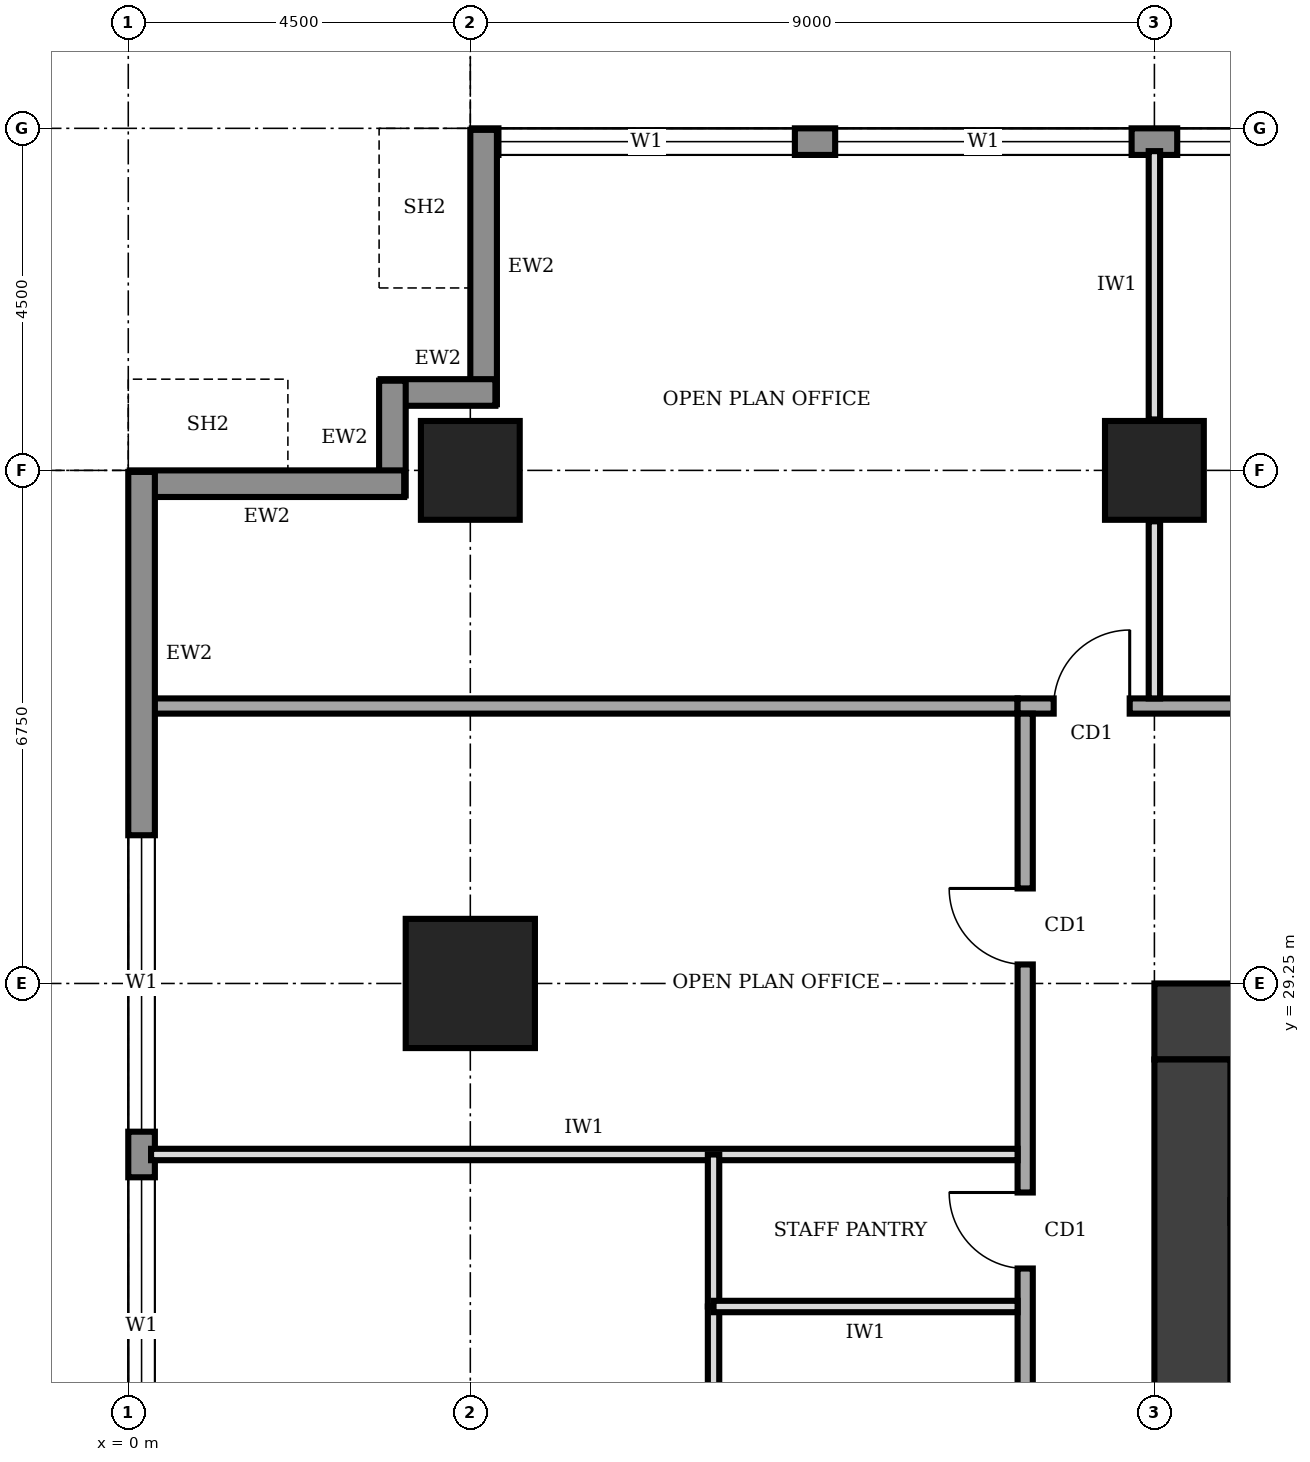
"""IFC4 building model, lengths in metres.
Left out: names, types, materials, properties, quantities, classifications, styles, units other than length and angle.
Written with IfcOpenShell. Run it as: python <this file> out.ifc"""

import sys

from ifc_helpers import new_model, si_unit, direction, frame, frame_2d, origin, origin_2d, place, context, subcontext, project, spatial, rectangle, extrude, element, fill, save


model = new_model("IFC4")
c1 = context("Model", 3, precision=1e-05, world=origin(), true_north=direction((0.0, 1.0)))
c2 = subcontext(c1, "Body", "Model", "MODEL_VIEW")
j1 = project(units=[si_unit("LENGTHUNIT", "METRE"), si_unit("PLANEANGLEUNIT", "RADIAN")], contexts=[c1])
p1 = place(None, origin())
s1 = spatial("IfcSite", under=j1, at=p1, CompositionType="ELEMENT")
p2 = place(p1, origin())
s2 = spatial("IfcBuilding", under=s1, at=p2, CompositionType="ELEMENT")
p3 = place(p2, frame((0.0, 0.0, 273.0)))
s3 = spatial("IfcBuildingStorey", under=s2, at=p3, CompositionType="ELEMENT", Elevation=273.0)
p4 = place(p3, frame((27.0, 28.75, 0.0), z_axis=(0.0, 0.0, 1.0), x_axis=(-1.0, 0.0, 0.0)))
e1 = element("IfcWall", 1, at=p4, inside=s3, PredefinedType="SHEAR", context=c2, shape_type="SweptSolid", body=[
    extrude(rectangle(XDim=13.5, YDim=1.0, at=frame_2d((6.75, 0.0))), origin(), (0.0, 0.0, 1.0), 4.0),
])
p5 = place(p4, frame((4.75, 0.0, 0.0)))
e2 = element("IfcOpeningElement", 2, at=p5, cuts=e1, PredefinedType="OPENING", context=c2, shape_type="SweptSolid", body=[
    extrude(rectangle(XDim=1.8, YDim=2.1, at=frame_2d((0.9, 1.05))), frame((0.0, 0.51, 0.0), z_axis=(0.0, -1.0, 0.0), x_axis=(1.0, 0.0, 0.0)), (0.0, 0.0, 1.0), 1.02),
])
p6 = place(p3, frame((14.0, 28.25, 0.0), z_axis=(0.0, 0.0, 1.0), x_axis=(0.0, -1.0, 0.0)))
e3 = element("IfcWall", 3, at=p6, inside=s3, PredefinedType="SHEAR", context=c2, shape_type="SweptSolid", body=[
    extrude(rectangle(XDim=16.0, YDim=1.0, at=frame_2d((8.0, 0.0))), origin(), (0.0, 0.0, 1.0), 4.0),
])
p7 = place(p3, frame((4.5, 29.25, 0.0), z_axis=(0.0, 0.0, 1.0), x_axis=(1.0, 0.0, 0.0)))
e4 = element("IfcColumn", 4, at=p7, inside=s3, PredefinedType="COLUMN", context=c2, shape_type="SweptSolid", body=[
    extrude(rectangle(XDim=1.7, YDim=1.7, at=origin_2d()), origin(), (0.0, 0.0, 1.0), 4.0),
])
for number, where, z_axis, x_axis in (
    (5, (4.5, 36.0, 0.0), (0.0, 0.0, 1.0), (1.0, 0.0, 0.0)),
    (6, (13.5, 36.0, 0.0), (0.0, 0.0, 1.0), (1.0, 0.0, 0.0)),
):
    element("IfcColumn", number, at=place(p3, frame(where, z_axis=z_axis, x_axis=x_axis)), inside=s3, PredefinedType="COLUMN", context=c2, shape_type="SweptSolid", body=[
        extrude(rectangle(XDim=1.3, YDim=1.3, at=origin_2d()), origin(), (0.0, 0.0, 1.0), 4.0),
    ])
p8 = place(p3, frame((35.98, 40.325, 0.0), z_axis=(0.0, 0.0, 1.0), x_axis=(-1.0, 0.0, 0.0)))
e7 = element("IfcWall", 7, at=p8, inside=s3, PredefinedType="STANDARD", context=c2, shape_type="SweptSolid", body=[
    extrude(rectangle(XDim=31.46, YDim=0.35, at=frame_2d((15.73, 0.0))), origin(), (0.0, 0.0, 1.0), 3.75),
])
p9 = place(p8, frame((27.21, 0.0, 0.9)))
e8 = element("IfcOpeningElement", 8, at=p9, cuts=e7, PredefinedType="OPENING", context=c2, shape_type="SweptSolid", body=[
    extrude(rectangle(XDim=3.9, YDim=2.2, at=frame_2d((1.95, 1.1))), frame((0.0, 0.185, 0.0), z_axis=(0.0, -1.0, 0.0), x_axis=(1.0, 0.0, 0.0)), (0.0, 0.0, 1.0), 0.37),
])
p10 = place(p8, frame((22.78, 0.0, 0.9)))
e9 = element("IfcOpeningElement", 9, at=p10, cuts=e7, PredefinedType="OPENING", context=c2, shape_type="SweptSolid", body=[
    extrude(rectangle(XDim=3.9, YDim=2.2, at=frame_2d((1.95, 1.1))), frame((0.0, 0.185, 0.0), z_axis=(0.0, -1.0, 0.0), x_axis=(1.0, 0.0, 0.0)), (0.0, 0.0, 1.0), 0.37),
])
p11 = place(p8, frame((18.28, 0.0, 0.9)))
e10 = element("IfcOpeningElement", 10, at=p11, cuts=e7, PredefinedType="OPENING", context=c2, shape_type="SweptSolid", body=[
    extrude(rectangle(XDim=3.9, YDim=2.2, at=frame_2d((1.95, 1.1))), frame((0.0, 0.185, 0.0), z_axis=(0.0, -1.0, 0.0), x_axis=(1.0, 0.0, 0.0)), (0.0, 0.0, 1.0), 0.37),
])
p12 = place(p8, frame((13.78, 0.0, 0.9)))
e11 = element("IfcOpeningElement", 11, at=p12, cuts=e7, PredefinedType="OPENING", context=c2, shape_type="SweptSolid", body=[
    extrude(rectangle(XDim=3.9, YDim=2.2, at=frame_2d((1.95, 1.1))), frame((0.0, 0.185, 0.0), z_axis=(0.0, -1.0, 0.0), x_axis=(1.0, 0.0, 0.0)), (0.0, 0.0, 1.0), 0.37),
])
p13 = place(p8, frame((9.28, 0.0, 0.9)))
e12 = element("IfcOpeningElement", 12, at=p13, cuts=e7, PredefinedType="OPENING", context=c2, shape_type="SweptSolid", body=[
    extrude(rectangle(XDim=3.9, YDim=2.2, at=frame_2d((1.95, 1.1))), frame((0.0, 0.185, 0.0), z_axis=(0.0, -1.0, 0.0), x_axis=(1.0, 0.0, 0.0)), (0.0, 0.0, 1.0), 0.37),
])
p14 = place(p8, frame((4.78, 0.0, 0.9)))
e13 = element("IfcOpeningElement", 13, at=p14, cuts=e7, PredefinedType="OPENING", context=c2, shape_type="SweptSolid", body=[
    extrude(rectangle(XDim=3.9, YDim=2.2, at=frame_2d((1.95, 1.1))), frame((0.0, 0.185, 0.0), z_axis=(0.0, -1.0, 0.0), x_axis=(1.0, 0.0, 0.0)), (0.0, 0.0, 1.0), 0.37),
])
p15 = place(p3, frame((4.675, 40.48, 0.0), z_axis=(0.0, 0.0, 1.0), x_axis=(0.0, -1.0, 0.0)))
e14 = element("IfcWall", 14, at=p15, inside=s3, PredefinedType="STANDARD", context=c2, shape_type="SweptSolid", body=[
    extrude(rectangle(XDim=3.61, YDim=0.35, at=frame_2d((1.805, 0.0))), origin(), (0.0, 0.0, 1.0), 2.85),
])
for number, where, z_axis, x_axis in (
    (15, (4.83, 37.025, 0.0), (0.0, 0.0, 1.0), (-1.0, 0.0, 0.0)),
    (16, (3.475, 37.18, 0.0), (0.0, 0.0, 1.0), (0.0, -1.0, 0.0)),
):
    element("IfcWall", number, at=place(p3, frame(where, z_axis=z_axis, x_axis=x_axis)), inside=s3, PredefinedType="STANDARD", context=c2, shape_type="SweptSolid", body=[
        extrude(rectangle(XDim=1.51, YDim=0.35, at=frame_2d((0.755, 0.0))), origin(), (0.0, 0.0, 1.0), 3.75),
    ])
p16 = place(p3, frame((3.63, 35.825, 0.0), z_axis=(0.0, 0.0, 1.0), x_axis=(-1.0, 0.0, 0.0)))
e17 = element("IfcWall", 17, at=p16, inside=s3, PredefinedType="STANDARD", context=c2, shape_type="SweptSolid", body=[
    extrude(rectangle(XDim=3.61, YDim=0.35, at=frame_2d((1.805, 0.0))), origin(), (0.0, 0.0, 1.0), 2.85),
])
p17 = place(p3, frame((0.175, 35.98, 0.0), z_axis=(0.0, 0.0, 1.0), x_axis=(0.0, -1.0, 0.0)))
e18 = element("IfcWall", 18, at=p17, inside=s3, PredefinedType="STANDARD", context=c2, shape_type="SweptSolid", body=[
    extrude(rectangle(XDim=31.46, YDim=0.35, at=frame_2d((15.73, 0.0))), origin(), (0.0, 0.0, 1.0), 3.75),
])
p18 = place(p17, frame((27.21, 0.0, 0.9)))
e19 = element("IfcOpeningElement", 19, at=p18, cuts=e18, PredefinedType="OPENING", context=c2, shape_type="SweptSolid", body=[
    extrude(rectangle(XDim=3.9, YDim=2.2, at=frame_2d((1.95, 1.1))), frame((0.0, 0.185, 0.0), z_axis=(0.0, -1.0, 0.0), x_axis=(1.0, 0.0, 0.0)), (0.0, 0.0, 1.0), 0.37),
])
p19 = place(p17, frame((22.78, 0.0, 0.9)))
e20 = element("IfcOpeningElement", 20, at=p19, cuts=e18, PredefinedType="OPENING", context=c2, shape_type="SweptSolid", body=[
    extrude(rectangle(XDim=3.9, YDim=2.2, at=frame_2d((1.95, 1.1))), frame((0.0, 0.185, 0.0), z_axis=(0.0, -1.0, 0.0), x_axis=(1.0, 0.0, 0.0)), (0.0, 0.0, 1.0), 0.37),
])
p20 = place(p17, frame((18.28, 0.0, 0.9)))
e21 = element("IfcOpeningElement", 21, at=p20, cuts=e18, PredefinedType="OPENING", context=c2, shape_type="SweptSolid", body=[
    extrude(rectangle(XDim=3.9, YDim=2.2, at=frame_2d((1.95, 1.1))), frame((0.0, 0.185, 0.0), z_axis=(0.0, -1.0, 0.0), x_axis=(1.0, 0.0, 0.0)), (0.0, 0.0, 1.0), 0.37),
])
p21 = place(p17, frame((13.78, 0.0, 0.9)))
e22 = element("IfcOpeningElement", 22, at=p21, cuts=e18, PredefinedType="OPENING", context=c2, shape_type="SweptSolid", body=[
    extrude(rectangle(XDim=3.9, YDim=2.2, at=frame_2d((1.95, 1.1))), frame((0.0, 0.185, 0.0), z_axis=(0.0, -1.0, 0.0), x_axis=(1.0, 0.0, 0.0)), (0.0, 0.0, 1.0), 0.37),
])
p22 = place(p17, frame((9.28, 0.0, 0.9)))
e23 = element("IfcOpeningElement", 23, at=p22, cuts=e18, PredefinedType="OPENING", context=c2, shape_type="SweptSolid", body=[
    extrude(rectangle(XDim=3.9, YDim=2.2, at=frame_2d((1.95, 1.1))), frame((0.0, 0.185, 0.0), z_axis=(0.0, -1.0, 0.0), x_axis=(1.0, 0.0, 0.0)), (0.0, 0.0, 1.0), 0.37),
])
p23 = place(p17, frame((4.78, 0.0, 0.9)))
e24 = element("IfcOpeningElement", 24, at=p23, cuts=e18, PredefinedType="OPENING", context=c2, shape_type="SweptSolid", body=[
    extrude(rectangle(XDim=3.9, YDim=2.2, at=frame_2d((1.95, 1.1))), frame((0.0, 0.185, 0.0), z_axis=(0.0, -1.0, 0.0), x_axis=(1.0, 0.0, 0.0)), (0.0, 0.0, 1.0), 0.37),
])
p24 = place(p3, frame((28.6, 32.9, 0.0), z_axis=(0.0, 0.0, 1.0), x_axis=(-1.0, 0.0, 0.0)))
e25 = element("IfcWall", 25, at=p24, inside=s3, PredefinedType="SOLIDWALL", context=c2, shape_type="SweptSolid", body=[
    extrude(rectangle(XDim=16.9, YDim=0.2, at=frame_2d((8.45, 0.0))), origin(), (0.0, 0.0, 1.0), 3.75),
])
p25 = place(p24, frame((15.425, 0.0, 0.0)))
e26 = element("IfcOpeningElement", 26, at=p25, cuts=e25, PredefinedType="OPENING", context=c2, shape_type="SweptSolid", body=[
    extrude(rectangle(XDim=1.0, YDim=2.1, at=frame_2d((0.5, 1.05))), frame((0.0, 0.11, 0.0), z_axis=(0.0, -1.0, 0.0), x_axis=(1.0, 0.0, 0.0)), (0.0, 0.0, 1.0), 0.22),
])
p26 = place(p24, frame((7.45, 0.0, 0.0)))
e27 = element("IfcOpeningElement", 27, at=p26, cuts=e25, PredefinedType="OPENING", context=c2, shape_type="SweptSolid", body=[
    extrude(rectangle(XDim=1.8, YDim=2.1, at=frame_2d((0.9, 1.05))), frame((0.0, 0.11, 0.0), z_axis=(0.0, -1.0, 0.0), x_axis=(1.0, 0.0, 0.0)), (0.0, 0.0, 1.0), 0.22),
])
p27 = place(p24, frame((0.275, 0.0, 0.0)))
e28 = element("IfcOpeningElement", 28, at=p27, cuts=e25, PredefinedType="OPENING", context=c2, shape_type="SweptSolid", body=[
    extrude(rectangle(XDim=1.0, YDim=2.1, at=frame_2d((0.5, 1.05))), frame((0.0, 0.11, 0.0), z_axis=(0.0, -1.0, 0.0), x_axis=(1.0, 0.0, 0.0)), (0.0, 0.0, 1.0), 0.22),
])
p28 = place(p3, frame((11.8, 32.8, 0.0), z_axis=(0.0, 0.0, 1.0), x_axis=(0.0, -1.0, 0.0)))
e29 = element("IfcWall", 29, at=p28, inside=s3, PredefinedType="SOLIDWALL", context=c2, shape_type="SweptSolid", body=[
    extrude(rectangle(XDim=23.8, YDim=0.2, at=frame_2d((11.9, 0.0))), origin(), (0.0, 0.0, 1.0), 3.75),
])
p29 = place(p28, frame((21.05, 0.0, 0.0)))
e30 = element("IfcOpeningElement", 30, at=p29, cuts=e29, PredefinedType="OPENING", context=c2, shape_type="SweptSolid", body=[
    extrude(rectangle(XDim=1.0, YDim=2.1, at=frame_2d((0.5, 1.05))), frame((0.0, 0.11, 0.0), z_axis=(0.0, -1.0, 0.0), x_axis=(1.0, 0.0, 0.0)), (0.0, 0.0, 1.0), 0.22),
])
p30 = place(p28, frame((16.95, 0.0, 0.0)))
e31 = element("IfcOpeningElement", 31, at=p30, cuts=e29, PredefinedType="OPENING", context=c2, shape_type="SweptSolid", body=[
    extrude(rectangle(XDim=0.9, YDim=2.1, at=frame_2d((0.45, 1.05))), frame((0.0, 0.11, 0.0), z_axis=(0.0, -1.0, 0.0), x_axis=(1.0, 0.0, 0.0)), (0.0, 0.0, 1.0), 0.22),
])
p31 = place(p28, frame((13.95, 0.0, 0.0)))
e32 = element("IfcOpeningElement", 32, at=p31, cuts=e29, PredefinedType="OPENING", context=c2, shape_type="SweptSolid", body=[
    extrude(rectangle(XDim=0.9, YDim=2.1, at=frame_2d((0.45, 1.05))), frame((0.0, 0.11, 0.0), z_axis=(0.0, -1.0, 0.0), x_axis=(1.0, 0.0, 0.0)), (0.0, 0.0, 1.0), 0.22),
])
p32 = place(p28, frame((9.1, 0.0, 0.0)))
e33 = element("IfcOpeningElement", 33, at=p32, cuts=e29, PredefinedType="OPENING", context=c2, shape_type="SweptSolid", body=[
    extrude(rectangle(XDim=0.9, YDim=2.1, at=frame_2d((0.45, 1.05))), frame((0.0, 0.11, 0.0), z_axis=(0.0, -1.0, 0.0), x_axis=(1.0, 0.0, 0.0)), (0.0, 0.0, 1.0), 0.22),
])
p33 = place(p28, frame((6.3, 0.0, 0.0)))
e34 = element("IfcOpeningElement", 34, at=p33, cuts=e29, PredefinedType="OPENING", context=c2, shape_type="SweptSolid", body=[
    extrude(rectangle(XDim=1.0, YDim=2.1, at=frame_2d((0.5, 1.05))), frame((0.0, 0.11, 0.0), z_axis=(0.0, -1.0, 0.0), x_axis=(1.0, 0.0, 0.0)), (0.0, 0.0, 1.0), 0.22),
])
p34 = place(p28, frame((11.8, 0.0, 0.0)))
e35 = element("IfcOpeningElement", 35, at=p34, cuts=e29, PredefinedType="OPENING", context=c2, shape_type="SweptSolid", body=[
    extrude(rectangle(XDim=1.0, YDim=2.1, at=frame_2d((0.5, 1.05))), frame((0.0, 0.11, 0.0), z_axis=(0.0, -1.0, 0.0), x_axis=(1.0, 0.0, 0.0)), (0.0, 0.0, 1.0), 0.22),
])
p35 = place(p28, frame((2.3, 0.0, 0.0)))
e36 = element("IfcOpeningElement", 36, at=p35, cuts=e29, PredefinedType="OPENING", context=c2, shape_type="SweptSolid", body=[
    extrude(rectangle(XDim=1.0, YDim=2.1, at=frame_2d((0.5, 1.05))), frame((0.0, 0.11, 0.0), z_axis=(0.0, -1.0, 0.0), x_axis=(1.0, 0.0, 0.0)), (0.0, 0.0, 1.0), 0.22),
])
p36 = place(p3, frame((0.3, 32.9, 0.0), z_axis=(0.0, 0.0, 1.0), x_axis=(1.0, 0.0, 0.0)))
e37 = element("IfcWall", 37, at=p36, inside=s3, PredefinedType="SOLIDWALL", context=c2, shape_type="SweptSolid", body=[
    extrude(rectangle(XDim=11.4, YDim=0.2, at=frame_2d((5.7, 0.0))), origin(), (0.0, 0.0, 1.0), 3.75),
])
p37 = place(p3, frame((13.5, 33.0, 0.0), z_axis=(0.0, 0.0, 1.0), x_axis=(0.0, 1.0, 0.0)))
e38 = element("IfcWall", 38, at=p37, inside=s3, PredefinedType="PARTITIONING", context=c2, shape_type="SweptSolid", body=[
    extrude(rectangle(XDim=2.33, YDim=0.15, at=frame_2d((1.165, 0.0))), origin(), (0.0, 0.0, 1.0), 2.85),
])
p38 = place(p3, frame((13.5, 36.67, 0.0), z_axis=(0.0, 0.0, 1.0), x_axis=(0.0, 1.0, 0.0)))
e39 = element("IfcWall", 39, at=p38, inside=s3, PredefinedType="PARTITIONING", context=c2, shape_type="SweptSolid", body=[
    extrude(rectangle(XDim=3.53, YDim=0.15, at=frame_2d((1.765, 0.0))), origin(), (0.0, 0.0, 1.0), 2.85),
])
p39 = place(p3, frame((0.3, 27.0, 0.0), z_axis=(0.0, 0.0, 1.0), x_axis=(1.0, 0.0, 0.0)))
e40 = element("IfcWall", 40, at=p39, inside=s3, PredefinedType="PARTITIONING", context=c2, shape_type="SweptSolid", body=[
    extrude(rectangle(XDim=11.4, YDim=0.15, at=frame_2d((5.7, 0.0))), origin(), (0.0, 0.0, 1.0), 3.75),
])
p40 = place(p3, frame((11.7, 25.0, 0.0), z_axis=(0.0, 0.0, 1.0), x_axis=(-1.0, 0.0, 0.0)))
e41 = element("IfcWall", 41, at=p40, inside=s3, PredefinedType="PARTITIONING", context=c2, shape_type="SweptSolid", body=[
    extrude(rectangle(XDim=4.0, YDim=0.15, at=frame_2d((2.0, 0.0))), origin(), (0.0, 0.0, 1.0), 3.75),
])
p41 = place(p3, frame((7.7, 21.5, 0.0), z_axis=(0.0, 0.0, 1.0), x_axis=(0.0, 1.0, 0.0)))
e42 = element("IfcWall", 42, at=p41, inside=s3, PredefinedType="PARTITIONING", context=c2, shape_type="SweptSolid", body=[
    extrude(rectangle(XDim=3.5, YDim=0.15, at=frame_2d((1.75, 0.0))), origin(), (0.0, 0.0, 1.0), 3.75),
])
p42 = place(p3, frame((7.7, 25.0, 0.0), z_axis=(0.0, 0.0, 1.0), x_axis=(0.0, 1.0, 0.0)))
e43 = element("IfcWall", 43, at=p42, inside=s3, PredefinedType="PARTITIONING", context=c2, shape_type="SweptSolid", body=[
    extrude(rectangle(XDim=2.0, YDim=0.15, at=frame_2d((1.0, 0.0))), origin(), (0.0, 0.0, 1.0), 3.75),
])
p43 = place(p9, origin())
e44 = element("IfcWindow", 44, at=p43, inside=s3, PartitioningType="SINGLE_PANEL", PredefinedType="WINDOW", context=c2, shape_type="SweptSolid", body=[
    extrude(rectangle(XDim=3.9, YDim=2.2, at=frame_2d((1.95, 1.1))), frame((0.0, 0.03, 0.0), z_axis=(0.0, -1.0, 0.0), x_axis=(1.0, 0.0, 0.0)), (0.0, 0.0, 1.0), 0.06),
])
fill(e8, e44)
p44 = place(p10, origin())
e45 = element("IfcWindow", 45, at=p44, inside=s3, PartitioningType="SINGLE_PANEL", PredefinedType="WINDOW", context=c2, shape_type="SweptSolid", body=[
    extrude(rectangle(XDim=3.9, YDim=2.2, at=frame_2d((1.95, 1.1))), frame((0.0, 0.03, 0.0), z_axis=(0.0, -1.0, 0.0), x_axis=(1.0, 0.0, 0.0)), (0.0, 0.0, 1.0), 0.06),
])
fill(e9, e45)
p45 = place(p11, origin())
e46 = element("IfcWindow", 46, at=p45, inside=s3, PartitioningType="SINGLE_PANEL", PredefinedType="WINDOW", context=c2, shape_type="SweptSolid", body=[
    extrude(rectangle(XDim=3.9, YDim=2.2, at=frame_2d((1.95, 1.1))), frame((0.0, 0.03, 0.0), z_axis=(0.0, -1.0, 0.0), x_axis=(1.0, 0.0, 0.0)), (0.0, 0.0, 1.0), 0.06),
])
fill(e10, e46)
p46 = place(p22, origin())
e47 = element("IfcWindow", 47, at=p46, inside=s3, PartitioningType="SINGLE_PANEL", PredefinedType="WINDOW", context=c2, shape_type="SweptSolid", body=[
    extrude(rectangle(XDim=3.9, YDim=2.2, at=frame_2d((1.95, 1.1))), frame((0.0, 0.03, 0.0), z_axis=(0.0, -1.0, 0.0), x_axis=(1.0, 0.0, 0.0)), (0.0, 0.0, 1.0), 0.06),
])
fill(e23, e47)
p47 = place(p23, origin())
e48 = element("IfcWindow", 48, at=p47, inside=s3, PartitioningType="SINGLE_PANEL", PredefinedType="WINDOW", context=c2, shape_type="SweptSolid", body=[
    extrude(rectangle(XDim=3.9, YDim=2.2, at=frame_2d((1.95, 1.1))), frame((0.0, 0.03, 0.0), z_axis=(0.0, -1.0, 0.0), x_axis=(1.0, 0.0, 0.0)), (0.0, 0.0, 1.0), 0.06),
])
fill(e24, e48)
p48 = place(p25, frame((1.0, 0.0, 0.0), z_axis=(0.0, 0.0, 1.0), x_axis=(-1.0, 0.0, 0.0)))
e49 = element("IfcDoor", 49, at=p48, inside=s3, OperationType="SINGLE_SWING_RIGHT", PredefinedType="DOOR", context=c2, shape_type="SweptSolid", body=[
    extrude(rectangle(XDim=1.0, YDim=2.1, at=frame_2d((0.5, 1.05))), frame((0.0, 0.025, 0.0), z_axis=(0.0, -1.0, 0.0), x_axis=(1.0, 0.0, 0.0)), (0.0, 0.0, 1.0), 0.05),
])
fill(e26, e49)
p49 = place(p33, frame((1.0, 0.0, 0.0), z_axis=(0.0, 0.0, 1.0), x_axis=(-1.0, 0.0, 0.0)))
e50 = element("IfcDoor", 50, at=p49, inside=s3, OperationType="SINGLE_SWING_RIGHT", PredefinedType="DOOR", context=c2, shape_type="SweptSolid", body=[
    extrude(rectangle(XDim=1.0, YDim=2.1, at=frame_2d((0.5, 1.05))), frame((0.0, 0.025, 0.0), z_axis=(0.0, -1.0, 0.0), x_axis=(1.0, 0.0, 0.0)), (0.0, 0.0, 1.0), 0.05),
])
fill(e34, e50)
p50 = place(p35, frame((1.0, 0.0, 0.0), z_axis=(0.0, 0.0, 1.0), x_axis=(-1.0, 0.0, 0.0)))
e51 = element("IfcDoor", 51, at=p50, inside=s3, OperationType="SINGLE_SWING_RIGHT", PredefinedType="DOOR", context=c2, shape_type="SweptSolid", body=[
    extrude(rectangle(XDim=1.0, YDim=2.1, at=frame_2d((0.5, 1.05))), frame((0.0, 0.025, 0.0), z_axis=(0.0, -1.0, 0.0), x_axis=(1.0, 0.0, 0.0)), (0.0, 0.0, 1.0), 0.05),
])
fill(e36, e51)
save(model, sys.argv[1])
